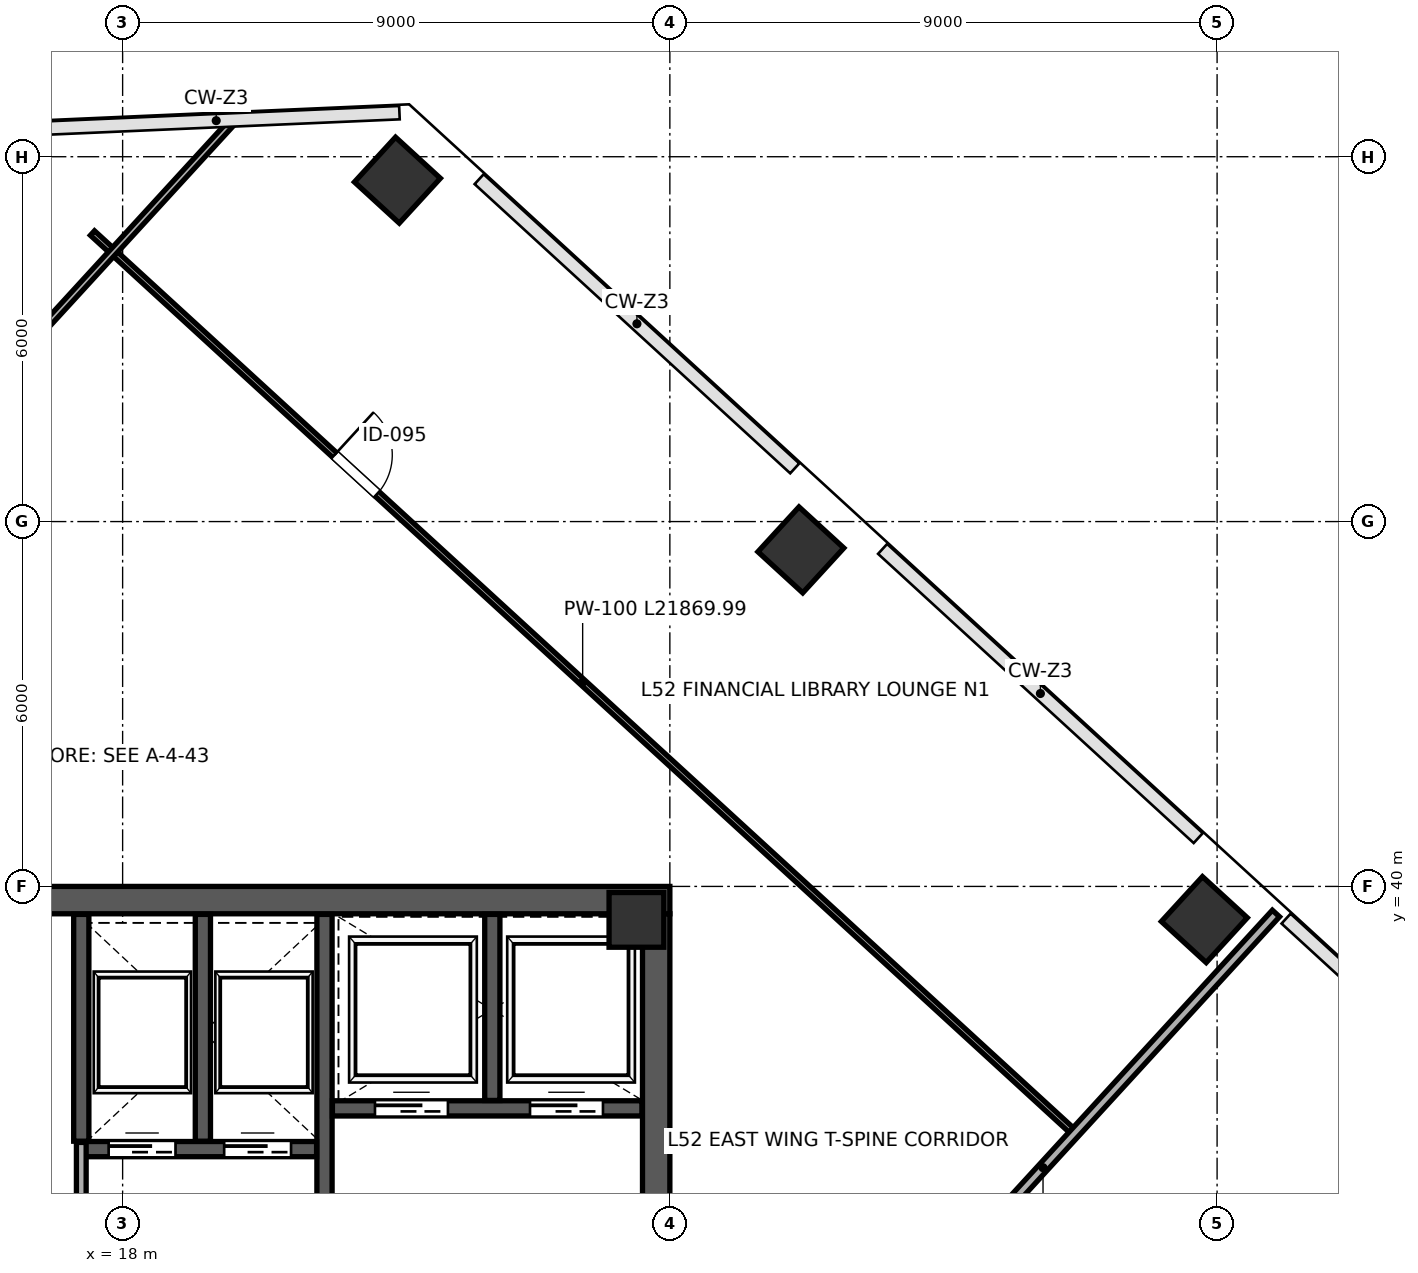
"""IFC4 building model, lengths in metres.
Left out: names, types, materials, properties, quantities, classifications, styles, units other than length and angle.
Written with IfcOpenShell. Run it as: python <this file> out.ifc"""

import sys

from ifc_helpers import new_model, si_unit, direction, frame, frame_2d, origin, origin_2d, place, context, subcontext, project, spatial, rectangle, extrude, source, transform, mapped, element, fill, save


model = new_model("IFC4")
c1 = context("Model", 3, precision=1e-05, world=origin(), true_north=direction((0.0, 1.0)))
c2 = subcontext(c1, "Body", "Model", "MODEL_VIEW")
j1 = project(units=[si_unit("LENGTHUNIT", "METRE"), si_unit("PLANEANGLEUNIT", "RADIAN")], contexts=[c1])
p1 = place(None, origin())
s1 = spatial("IfcSite", under=j1, at=p1, CompositionType="ELEMENT")
p2 = place(p1, origin())
s2 = spatial("IfcBuilding", under=s1, at=p2, CompositionType="ELEMENT")
p3 = place(p2, frame((0.0, 0.0, 233.2)))
s3 = spatial("IfcBuildingStorey", under=s2, at=p3, CompositionType="ELEMENT", Elevation=233.2)
m1 = source(origin(), c2, "Body", "SweptSolid", [
    extrude(rectangle(XDim=0.9, YDim=0.9, at=origin_2d()), origin(), (0.0, 0.0, 1.0), 4.198),
])
p4 = place(p3, frame((26.45, 39.45, 0.001), z_axis=(0.0, 0.0, 1.0), x_axis=(1.0, 0.0, 0.0)))
e1 = element("IfcColumn", 1, at=p4, inside=s3, PredefinedType="COLUMN", context=c2, shape_type="MappedRepresentation", body=[
    mapped(m1, transform((0.0, 0.0, 0.0), scale=1.0)),
])
m2 = source(origin(), c2, "Body", "SweptSolid", [
    extrude(rectangle(XDim=1.0, YDim=1.0, at=origin_2d()), origin(), (0.0, 0.0, 1.0), 4.198),
])
for number, where, z_axis, x_axis in (
    (2, (22.519, 51.615, 0.001), (0.0, 0.0, 1.0), (-0.737, 0.676, 0.0)),
    (3, (29.155, 45.534, 0.001), (0.0, 0.0, 1.0), (-0.737, 0.676, 0.0)),
    (4, (35.79, 39.454, 0.001), (0.0, 0.0, 1.0), (-0.737, 0.676, 0.0)),
):
    element("IfcColumn", number, at=place(p3, frame(where, z_axis=z_axis, x_axis=x_axis)), inside=s3, PredefinedType="COLUMN", context=c2, shape_type="MappedRepresentation", body=[
        mapped(m2, transform((0.0, 0.0, 0.0), scale=1.0)),
    ])
p5 = place(p3, frame((26.775, 24.45, 0.0), z_axis=(0.0, 0.0, 1.0), x_axis=(0.0, 1.0, 0.0)))
e5 = element("IfcWall", 5, at=p5, inside=s3, PredefinedType="SHEAR", context=c2, shape_type="SweptSolid", body=[
    extrude(rectangle(XDim=15.1, YDim=0.45, at=frame_2d((7.55, 0.0))), origin(), (0.0, 0.0, 1.0), 3.96),
])
p6 = place(p5, frame((8.6, 0.0, 0.0)))
e6 = element("IfcOpeningElement", 6, at=p6, cuts=e5, PredefinedType="OPENING", context=c2, shape_type="SweptSolid", body=[
    extrude(rectangle(XDim=1.15, YDim=2.2, at=frame_2d((0.575, 1.1))), frame((0.0, 0.235, 0.0), z_axis=(0.0, -1.0, 0.0), x_axis=(1.0, 0.0, 0.0)), (0.0, 0.0, 1.0), 0.47),
])
p7 = place(p3, frame((9.0, 39.775, 0.0), z_axis=(0.0, 0.0, 1.0), x_axis=(1.0, 0.0, 0.0)))
e7 = element("IfcWall", 7, at=p7, inside=s3, PredefinedType="SHEAR", context=c2, shape_type="SweptSolid", body=[
    extrude(rectangle(XDim=18.0, YDim=0.45, at=frame_2d((9.0, 0.0))), origin(), (0.0, 0.0, 1.0), 3.96),
])
p8 = place(p3, frame((21.32, 32.12, 0.0), z_axis=(0.0, 0.0, 1.0), x_axis=(0.0, 1.0, 0.0)))
e8 = element("IfcWall", 8, at=p8, inside=s3, PredefinedType="SHEAR", context=c2, shape_type="SweptSolid", body=[
    extrude(rectangle(XDim=7.42, YDim=0.25, at=frame_2d((3.71, 0.0))), origin(), (0.0, 0.0, 1.0), 3.96),
])
p9 = place(p8, frame((1.4, 0.0, 0.0)))
e9 = element("IfcOpeningElement", 9, at=p9, cuts=e8, PredefinedType="OPENING", context=c2, shape_type="SweptSolid", body=[
    extrude(rectangle(XDim=1.15, YDim=2.2, at=frame_2d((0.575, 1.1))), frame((0.0, 0.135, 0.0), z_axis=(0.0, -1.0, 0.0), x_axis=(1.0, 0.0, 0.0)), (0.0, 0.0, 1.0), 0.27),
])
p10 = place(p3, frame((21.45, 36.35, 0.0), z_axis=(0.0, 0.0, 1.0), x_axis=(1.0, 0.0, 0.0)))
e10 = element("IfcWall", 10, at=p10, inside=s3, PredefinedType="SHEAR", context=c2, shape_type="SweptSolid", body=[
    extrude(rectangle(XDim=5.09, YDim=0.25, at=frame_2d((2.545, 0.0))), origin(), (0.0, 0.0, 1.0), 3.96),
])
p11 = place(p10, frame((0.7, 0.0, 0.0)))
e11 = element("IfcOpeningElement", 11, at=p11, cuts=e10, PredefinedType="OPENING", context=c2, shape_type="SweptSolid", body=[
    extrude(rectangle(XDim=1.2, YDim=2.2, at=frame_2d((0.6, 1.1))), frame((0.0, 0.135, 0.0), z_axis=(0.0, -1.0, 0.0), x_axis=(1.0, 0.0, 0.0)), (0.0, 0.0, 1.0), 0.27),
])
p12 = place(p10, frame((3.25, 0.0, 0.0)))
e12 = element("IfcOpeningElement", 12, at=p12, cuts=e10, PredefinedType="OPENING", context=c2, shape_type="SweptSolid", body=[
    extrude(rectangle(XDim=1.2, YDim=2.2, at=frame_2d((0.6, 1.1))), frame((0.0, 0.135, 0.0), z_axis=(0.0, -1.0, 0.0), x_axis=(1.0, 0.0, 0.0)), (0.0, 0.0, 1.0), 0.27),
])
p13 = place(p3, frame((24.08, 36.48, 0.0), z_axis=(0.0, 0.0, 1.0), x_axis=(0.0, 1.0, 0.0)))
e13 = element("IfcWall", 13, at=p13, inside=s3, PredefinedType="SHEAR", context=c2, shape_type="SweptSolid", body=[
    extrude(rectangle(XDim=3.06, YDim=0.25, at=frame_2d((1.53, 0.0))), origin(), (0.0, 0.0, 1.0), 3.96),
])
p14 = place(p3, frame((17.32, 35.68, 0.0), z_axis=(0.0, 0.0, 1.0), x_axis=(1.0, 0.0, 0.0)))
e14 = element("IfcWall", 14, at=p14, inside=s3, PredefinedType="SHEAR", context=c2, shape_type="SweptSolid", body=[
    extrude(rectangle(XDim=3.87, YDim=0.25, at=frame_2d((1.935, 0.0))), origin(), (0.0, 0.0, 1.0), 3.96),
])
p15 = place(p14, frame((0.45, 0.0, 0.0)))
e15 = element("IfcOpeningElement", 15, at=p15, cuts=e14, PredefinedType="OPENING", context=c2, shape_type="SweptSolid", body=[
    extrude(rectangle(XDim=1.1, YDim=2.2, at=frame_2d((0.55, 1.1))), frame((0.0, 0.135, 0.0), z_axis=(0.0, -1.0, 0.0), x_axis=(1.0, 0.0, 0.0)), (0.0, 0.0, 1.0), 0.27),
])
p16 = place(p14, frame((2.35, 0.0, 0.0)))
e16 = element("IfcOpeningElement", 16, at=p16, cuts=e14, PredefinedType="OPENING", context=c2, shape_type="SweptSolid", body=[
    extrude(rectangle(XDim=1.1, YDim=2.2, at=frame_2d((0.55, 1.1))), frame((0.0, 0.135, 0.0), z_axis=(0.0, -1.0, 0.0), x_axis=(1.0, 0.0, 0.0)), (0.0, 0.0, 1.0), 0.27),
])
for number, where, z_axis, x_axis in (
    (17, (17.32, 35.81, 0.0), (0.0, 0.0, 1.0), (0.0, 1.0, 0.0)),
    (18, (19.32, 35.81, 0.0), (0.0, 0.0, 1.0), (0.0, 1.0, 0.0)),
):
    element("IfcWall", number, at=place(p3, frame(where, z_axis=z_axis, x_axis=x_axis)), inside=s3, PredefinedType="SHEAR", context=c2, shape_type="SweptSolid", body=[
        extrude(rectangle(XDim=3.73, YDim=0.25, at=frame_2d((1.865, 0.0))), origin(), (0.0, 0.0, 1.0), 3.96),
    ])
p17 = place(p3, frame((17.32, 33.86, 0.0), z_axis=(0.0, 0.0, 1.0), x_axis=(0.0, 1.0, 0.0)))
e19 = element("IfcWall", 19, at=p17, inside=s3, PredefinedType="PARTITIONING", context=c2, shape_type="SweptSolid", body=[
    extrude(rectangle(XDim=1.93, YDim=0.16, at=frame_2d((0.965, 0.0))), origin(), (0.0, 0.0, 1.0), 3.96),
])
p18 = place(p3, frame((17.504, 50.744, 0.0), z_axis=(0.0, 0.0, 1.0), x_axis=(0.737277850523, -0.675589646996, 0.0)))
e20 = element("IfcWall", 20, at=p18, inside=s3, PredefinedType="PARTITIONING", context=c2, shape_type="SweptSolid", body=[
    extrude(rectangle(XDim=21.87, YDim=0.1, at=frame_2d((10.935, 0.0))), origin(), (0.0, 0.0, 1.0), 3.96),
])
p19 = place(p18, frame((5.4, 0.0, 0.0)))
e21 = element("IfcOpeningElement", 21, at=p19, cuts=e20, PredefinedType="OPENING", context=c2, shape_type="SweptSolid", body=[
    extrude(rectangle(XDim=0.95, YDim=2.15, at=frame_2d((0.475, 1.075))), frame((0.0, 0.06, 0.0), z_axis=(0.0, -1.0, 0.0), x_axis=(1.0, 0.0, 0.0)), (0.0, 0.0, 1.0), 0.12),
])
p20 = place(p3, frame((1.73, 32.85, 0.0), z_axis=(0.0, 0.0, 1.0), x_axis=(0.675589845589, 0.737277668546, 0.0)))
e22 = element("IfcWall", 22, at=p20, inside=s3, PredefinedType="PARTITIONING", context=c2, shape_type="SweptSolid", body=[
    extrude(rectangle(XDim=26.742, YDim=0.115, at=frame_2d((13.371, 0.0))), origin(), (0.0, 0.0, 1.0), 3.96),
])
p21 = place(p3, frame((29.307, 31.194, 0.0), z_axis=(0.0, 0.0, 1.0), x_axis=(0.67558228032, 0.73728460076, 0.0)))
e23 = element("IfcWall", 23, at=p21, inside=s3, PredefinedType="PARTITIONING", context=c2, shape_type="SweptSolid", body=[
    extrude(rectangle(XDim=11.34, YDim=0.16, at=frame_2d((5.67, 0.0))), origin(), (0.0, 0.0, 1.0), 3.195),
])
m3 = source(origin(), c2, "Body", "SweptSolid", [
    extrude(rectangle(XDim=1.1, YDim=2.2, at=frame_2d((0.55, 1.1))), frame((0.0, 0.025, 0.0), z_axis=(0.0, -1.0, 0.0), x_axis=(1.0, 0.0, 0.0)), (0.0, 0.0, 1.0), 0.05),
])
p22 = place(p15, origin())
e24 = element("IfcDoor", 24, at=p22, inside=s3, OperationType="SLIDING_TO_LEFT", PredefinedType="DOOR", context=c2, shape_type="MappedRepresentation", body=[
    mapped(m3, transform((0.0, 0.0, 0.0), scale=1.0)),
])
fill(e15, e24)
p23 = place(p16, origin())
e25 = element("IfcDoor", 25, at=p23, inside=s3, OperationType="SLIDING_TO_RIGHT", PredefinedType="DOOR", context=c2, shape_type="MappedRepresentation", body=[
    mapped(m3, transform((0.0, 0.0, 0.0), scale=1.0)),
])
fill(e16, e25)
m4 = source(origin(), c2, "Body", "SweptSolid", [
    extrude(rectangle(XDim=1.2, YDim=2.2, at=frame_2d((0.6, 1.1))), frame((0.0, 0.025, 0.0), z_axis=(0.0, -1.0, 0.0), x_axis=(1.0, 0.0, 0.0)), (0.0, 0.0, 1.0), 0.05),
])
p24 = place(p11, origin())
e26 = element("IfcDoor", 26, at=p24, inside=s3, OperationType="SLIDING_TO_LEFT", PredefinedType="DOOR", context=c2, shape_type="MappedRepresentation", body=[
    mapped(m4, transform((0.0, 0.0, 0.0), scale=1.0)),
])
fill(e11, e26)
p25 = place(p12, origin())
e27 = element("IfcDoor", 27, at=p25, inside=s3, OperationType="SLIDING_TO_RIGHT", PredefinedType="DOOR", context=c2, shape_type="MappedRepresentation", body=[
    mapped(m4, transform((0.0, 0.0, 0.0), scale=1.0)),
])
fill(e12, e27)
m5 = source(origin(), c2, "Body", "SweptSolid", [
    extrude(rectangle(XDim=0.95, YDim=2.15, at=frame_2d((0.475, 1.075))), frame((0.0, 0.025, 0.0), z_axis=(0.0, -1.0, 0.0), x_axis=(1.0, 0.0, 0.0)), (0.0, 0.0, 1.0), 0.05),
])
p26 = place(p19, origin())
e28 = element("IfcDoor", 28, at=p26, inside=s3, OperationType="SINGLE_SWING_LEFT", PredefinedType="DOOR", context=c2, shape_type="MappedRepresentation", body=[
    mapped(m5, transform((0.0, 0.0, 0.0), scale=1.0)),
])
fill(e21, e28)
save(model, sys.argv[1])
